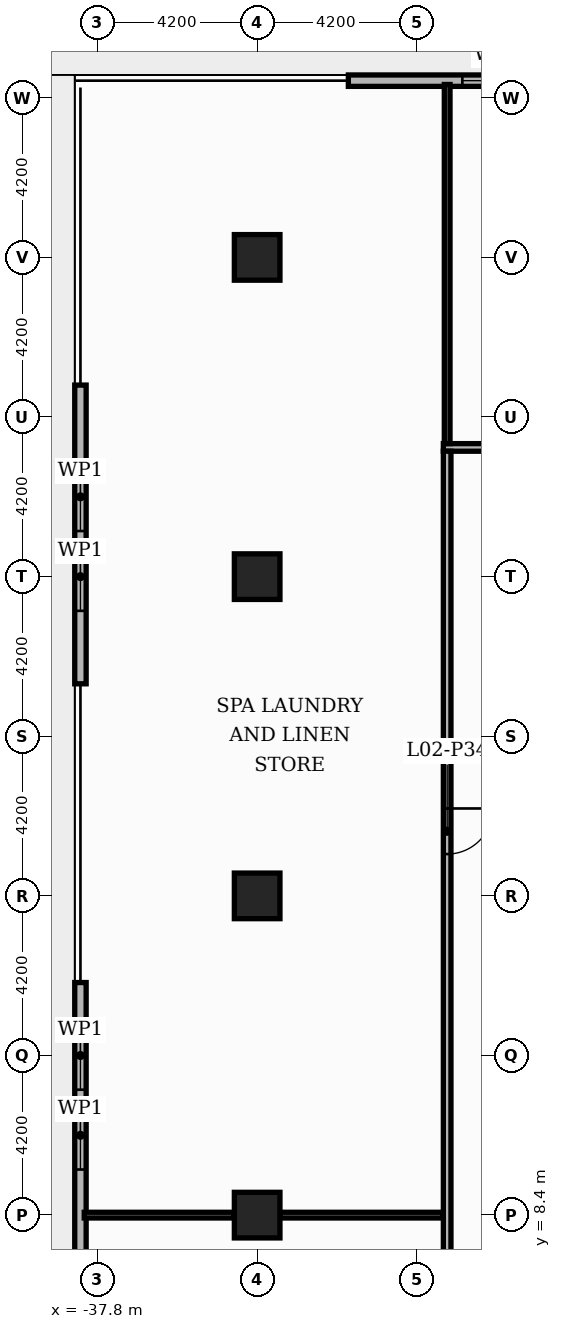
"""IFC4 building model, lengths in metres.
Left out: names, types, materials, properties, quantities, classifications, styles, units other than length and angle.
Written with IfcOpenShell. Run it as: python <this file> out.ifc"""

import sys

from ifc_helpers import new_model, si_unit, direction, frame, frame_2d, origin, origin_2d, place, context, subcontext, project, spatial, rectangle, extrude, element, fill, save


model = new_model("IFC4")
c1 = context("Model", 3, precision=1e-05, world=origin(), true_north=direction((0.0, 1.0)))
c2 = subcontext(c1, "Body", "Model", "MODEL_VIEW")
j1 = project(units=[si_unit("LENGTHUNIT", "METRE"), si_unit("PLANEANGLEUNIT", "RADIAN")], contexts=[c1])
p1 = place(None, origin())
s1 = spatial("IfcSite", under=j1, at=p1, CompositionType="ELEMENT")
p2 = place(p1, origin())
s2 = spatial("IfcBuilding", under=s1, at=p2, CompositionType="ELEMENT")
p3 = place(p2, frame((0.0, 0.0, 12.0)))
s3 = spatial("IfcBuildingStorey", under=s2, at=p3, CompositionType="ELEMENT", Elevation=12.0)
for number, where, z_axis, x_axis in (
    (1, (-33.6, 8.4, 0.0), (0.0, 0.0, 1.0), (1.0, 0.0, 0.0)),
    (2, (-33.6, 16.8, 0.0), (0.0, 0.0, 1.0), (1.0, 0.0, 0.0)),
    (3, (-33.6, 25.2, 0.0), (0.0, 0.0, 1.0), (1.0, 0.0, 0.0)),
    (4, (-33.6, 33.6, 0.0), (0.0, 0.0, 1.0), (1.0, 0.0, 0.0)),
):
    element("IfcColumn", number, at=place(p3, frame(where, z_axis=z_axis, x_axis=x_axis)), inside=s3, PredefinedType="COLUMN", context=c2, shape_type="SweptSolid", body=[
        extrude(rectangle(XDim=1.2, YDim=1.2, at=origin_2d()), origin(), (0.0, 0.0, 1.0), 4.8),
    ])
p4 = place(p3, frame((-24.0, 38.25, 0.0), z_axis=(0.0, 0.0, 1.0), x_axis=(-1.0, 0.0, 0.0)))
e5 = element("IfcWall", 5, at=p4, inside=s3, PredefinedType="STANDARD", context=c2, shape_type="SweptSolid", body=[
    extrude(rectangle(XDim=7.2, YDim=0.3, at=frame_2d((3.6, 0.0))), origin(), (0.0, 0.0, 1.0), 4.38),
])
p5 = place(p4, frame((0.3, 0.0, 0.6)))
e6 = element("IfcOpeningElement", 6, at=p5, cuts=e5, PredefinedType="OPENING", context=c2, shape_type="SweptSolid", body=[
    extrude(rectangle(XDim=1.8, YDim=3.0, at=frame_2d((0.9, 1.5))), frame((0.0, 0.16, 0.0), z_axis=(0.0, -1.0, 0.0), x_axis=(1.0, 0.0, 0.0)), (0.0, 0.0, 1.0), 0.32),
])
p6 = place(p4, frame((2.4, 0.0, 0.6)))
e7 = element("IfcOpeningElement", 7, at=p6, cuts=e5, PredefinedType="OPENING", context=c2, shape_type="SweptSolid", body=[
    extrude(rectangle(XDim=1.8, YDim=3.0, at=frame_2d((0.9, 1.5))), frame((0.0, 0.16, 0.0), z_axis=(0.0, -1.0, 0.0), x_axis=(1.0, 0.0, 0.0)), (0.0, 0.0, 1.0), 0.32),
])
p7 = place(p3, frame((-38.25, 30.24, 0.0), z_axis=(0.0, 0.0, 1.0), x_axis=(0.0, -1.0, 0.0)))
e8 = element("IfcWall", 8, at=p7, inside=s3, PredefinedType="STANDARD", context=c2, shape_type="SweptSolid", body=[
    extrude(rectangle(XDim=7.86, YDim=0.3, at=frame_2d((3.93, 0.0))), origin(), (0.0, 0.0, 1.0), 4.38),
])
p8 = place(p7, frame((2.04, 0.0, 0.6)))
e9 = element("IfcOpeningElement", 9, at=p8, cuts=e8, PredefinedType="OPENING", context=c2, shape_type="SweptSolid", body=[
    extrude(rectangle(XDim=1.8, YDim=3.0, at=frame_2d((0.9, 1.5))), frame((0.0, 0.16, 0.0), z_axis=(0.0, -1.0, 0.0), x_axis=(1.0, 0.0, 0.0)), (0.0, 0.0, 1.0), 0.32),
])
p9 = place(p7, frame((4.14, 0.0, 0.6)))
e10 = element("IfcOpeningElement", 10, at=p9, cuts=e8, PredefinedType="OPENING", context=c2, shape_type="SweptSolid", body=[
    extrude(rectangle(XDim=1.8, YDim=3.0, at=frame_2d((0.9, 1.5))), frame((0.0, 0.16, 0.0), z_axis=(0.0, -1.0, 0.0), x_axis=(1.0, 0.0, 0.0)), (0.0, 0.0, 1.0), 0.32),
])
p10 = place(p3, frame((-38.25, 14.52, 0.0), z_axis=(0.0, 0.0, 1.0), x_axis=(0.0, -1.0, 0.0)))
e11 = element("IfcWall", 11, at=p10, inside=s3, PredefinedType="STANDARD", context=c2, shape_type="SweptSolid", body=[
    extrude(rectangle(XDim=7.86, YDim=0.3, at=frame_2d((3.93, 0.0))), origin(), (0.0, 0.0, 1.0), 4.38),
])
p11 = place(p10, frame((1.02, 0.0, 0.6)))
e12 = element("IfcOpeningElement", 12, at=p11, cuts=e11, PredefinedType="OPENING", context=c2, shape_type="SweptSolid", body=[
    extrude(rectangle(XDim=1.8, YDim=3.0, at=frame_2d((0.9, 1.5))), frame((0.0, 0.16, 0.0), z_axis=(0.0, -1.0, 0.0), x_axis=(1.0, 0.0, 0.0)), (0.0, 0.0, 1.0), 0.32),
])
p12 = place(p10, frame((3.12, 0.0, 0.6)))
e13 = element("IfcOpeningElement", 13, at=p12, cuts=e11, PredefinedType="OPENING", context=c2, shape_type="SweptSolid", body=[
    extrude(rectangle(XDim=1.8, YDim=3.0, at=frame_2d((0.9, 1.5))), frame((0.0, 0.16, 0.0), z_axis=(0.0, -1.0, 0.0), x_axis=(1.0, 0.0, 0.0)), (0.0, 0.0, 1.0), 0.32),
])
p13 = place(p3, frame((-38.15, 8.4, 0.0), z_axis=(0.0, 0.0, 1.0), x_axis=(1.0, 0.0, 0.0)))
e14 = element("IfcWall", 14, at=p13, inside=s3, PredefinedType="PARTITIONING", context=c2, shape_type="SweptSolid", body=[
    extrude(rectangle(XDim=3.95, YDim=0.15, at=frame_2d((1.975, 0.0))), origin(), (0.0, 0.0, 1.0), 4.18),
])
p14 = place(p3, frame((-33.0, 8.4, 0.0), z_axis=(0.0, 0.0, 1.0), x_axis=(1.0, 0.0, 0.0)))
e15 = element("IfcWall", 15, at=p14, inside=s3, PredefinedType="PARTITIONING", context=c2, shape_type="SweptSolid", body=[
    extrude(rectangle(XDim=4.3, YDim=0.15, at=frame_2d((2.15, 0.0))), origin(), (0.0, 0.0, 1.0), 4.18),
])
p15 = place(p3, frame((-28.7, 28.6, 0.0), z_axis=(0.0, 0.0, 1.0), x_axis=(1.0, 0.0, 0.0)))
e16 = element("IfcWall", 16, at=p15, inside=s3, PredefinedType="PARTITIONING", context=c2, shape_type="SweptSolid", body=[
    extrude(rectangle(XDim=57.4, YDim=0.2, at=frame_2d((28.7, 0.0))), origin(), (0.0, 0.0, 1.0), 4.08),
])
p16 = place(p15, frame((7.5, 0.0, 0.0)))
e17 = element("IfcOpeningElement", 17, at=p16, cuts=e16, PredefinedType="OPENING", context=c2, shape_type="SweptSolid", body=[
    extrude(rectangle(XDim=1.2, YDim=2.2, at=frame_2d((0.6, 1.1))), frame((0.0, 0.11, 0.0), z_axis=(0.0, -1.0, 0.0), x_axis=(1.0, 0.0, 0.0)), (0.0, 0.0, 1.0), 0.22),
])
p17 = place(p15, frame((23.9, 0.0, 0.0)))
e18 = element("IfcOpeningElement", 18, at=p17, cuts=e16, PredefinedType="OPENING", context=c2, shape_type="SweptSolid", body=[
    extrude(rectangle(XDim=1.2, YDim=2.2, at=frame_2d((0.6, 1.1))), frame((0.0, 0.11, 0.0), z_axis=(0.0, -1.0, 0.0), x_axis=(1.0, 0.0, 0.0)), (0.0, 0.0, 1.0), 0.22),
])
p18 = place(p15, frame((44.5, 0.0, 0.0)))
e19 = element("IfcOpeningElement", 19, at=p18, cuts=e16, PredefinedType="OPENING", context=c2, shape_type="SweptSolid", body=[
    extrude(rectangle(XDim=1.2, YDim=2.2, at=frame_2d((0.6, 1.1))), frame((0.0, 0.11, 0.0), z_axis=(0.0, -1.0, 0.0), x_axis=(1.0, 0.0, 0.0)), (0.0, 0.0, 1.0), 0.22),
])
p19 = place(p3, frame((-28.6, -28.5, 0.0), z_axis=(0.0, 0.0, 1.0), x_axis=(0.0, 1.0, 0.0)))
e20 = element("IfcWall", 20, at=p19, inside=s3, PredefinedType="PARTITIONING", context=c2, shape_type="SweptSolid", body=[
    extrude(rectangle(XDim=57.0, YDim=0.2, at=frame_2d((28.5, 0.0))), origin(), (0.0, 0.0, 1.0), 4.18),
])
p20 = place(p19, frame((9.4, 0.0, 0.0)))
e21 = element("IfcOpeningElement", 21, at=p20, cuts=e20, PredefinedType="OPENING", context=c2, shape_type="SweptSolid", body=[
    extrude(rectangle(XDim=1.2, YDim=2.2, at=frame_2d((0.6, 1.1))), frame((0.0, 0.11, 0.0), z_axis=(0.0, -1.0, 0.0), x_axis=(1.0, 0.0, 0.0)), (0.0, 0.0, 1.0), 0.22),
])
p21 = place(p19, frame((27.9, 0.0, 0.0)))
e22 = element("IfcOpeningElement", 22, at=p21, cuts=e20, PredefinedType="OPENING", context=c2, shape_type="SweptSolid", body=[
    extrude(rectangle(XDim=1.2, YDim=2.2, at=frame_2d((0.6, 1.1))), frame((0.0, 0.11, 0.0), z_axis=(0.0, -1.0, 0.0), x_axis=(1.0, 0.0, 0.0)), (0.0, 0.0, 1.0), 0.22),
])
p22 = place(p19, frame((46.4, 0.0, 0.0)))
e23 = element("IfcOpeningElement", 23, at=p22, cuts=e20, PredefinedType="OPENING", context=c2, shape_type="SweptSolid", body=[
    extrude(rectangle(XDim=1.2, YDim=2.2, at=frame_2d((0.6, 1.1))), frame((0.0, 0.11, 0.0), z_axis=(0.0, -1.0, 0.0), x_axis=(1.0, 0.0, 0.0)), (0.0, 0.0, 1.0), 0.22),
])
p23 = place(p3, frame((-28.6, 28.7, 0.0), z_axis=(0.0, 0.0, 1.0), x_axis=(0.0, 1.0, 0.0)))
e24 = element("IfcWall", 24, at=p23, inside=s3, PredefinedType="PARTITIONING", context=c2, shape_type="SweptSolid", body=[
    extrude(rectangle(XDim=9.45, YDim=0.15, at=frame_2d((4.725, 0.0))), origin(), (0.0, 0.0, 1.0), 4.18),
])
p24 = place(p6, origin())
e25 = element("IfcWindow", 25, at=p24, inside=s3, PartitioningType="SINGLE_PANEL", PredefinedType="WINDOW", context=c2, shape_type="SweptSolid", body=[
    extrude(rectangle(XDim=1.8, YDim=3.0, at=frame_2d((0.9, 1.5))), frame((0.0, 0.03, 0.0), z_axis=(0.0, -1.0, 0.0), x_axis=(1.0, 0.0, 0.0)), (0.0, 0.0, 1.0), 0.06),
])
fill(e7, e25)
p25 = place(p8, origin())
e26 = element("IfcWindow", 26, at=p25, inside=s3, PartitioningType="SINGLE_PANEL", PredefinedType="WINDOW", context=c2, shape_type="SweptSolid", body=[
    extrude(rectangle(XDim=1.8, YDim=3.0, at=frame_2d((0.9, 1.5))), frame((0.0, 0.03, 0.0), z_axis=(0.0, -1.0, 0.0), x_axis=(1.0, 0.0, 0.0)), (0.0, 0.0, 1.0), 0.06),
])
fill(e9, e26)
p26 = place(p9, origin())
e27 = element("IfcWindow", 27, at=p26, inside=s3, PartitioningType="SINGLE_PANEL", PredefinedType="WINDOW", context=c2, shape_type="SweptSolid", body=[
    extrude(rectangle(XDim=1.8, YDim=3.0, at=frame_2d((0.9, 1.5))), frame((0.0, 0.03, 0.0), z_axis=(0.0, -1.0, 0.0), x_axis=(1.0, 0.0, 0.0)), (0.0, 0.0, 1.0), 0.06),
])
fill(e10, e27)
p27 = place(p11, origin())
e28 = element("IfcWindow", 28, at=p27, inside=s3, PartitioningType="SINGLE_PANEL", PredefinedType="WINDOW", context=c2, shape_type="SweptSolid", body=[
    extrude(rectangle(XDim=1.8, YDim=3.0, at=frame_2d((0.9, 1.5))), frame((0.0, 0.03, 0.0), z_axis=(0.0, -1.0, 0.0), x_axis=(1.0, 0.0, 0.0)), (0.0, 0.0, 1.0), 0.06),
])
fill(e12, e28)
p28 = place(p12, origin())
e29 = element("IfcWindow", 29, at=p28, inside=s3, PartitioningType="SINGLE_PANEL", PredefinedType="WINDOW", context=c2, shape_type="SweptSolid", body=[
    extrude(rectangle(XDim=1.8, YDim=3.0, at=frame_2d((0.9, 1.5))), frame((0.0, 0.03, 0.0), z_axis=(0.0, -1.0, 0.0), x_axis=(1.0, 0.0, 0.0)), (0.0, 0.0, 1.0), 0.06),
])
fill(e13, e29)
p29 = place(p22, origin())
e30 = element("IfcDoor", 30, at=p29, inside=s3, OperationType="SINGLE_SWING_RIGHT", PredefinedType="DOOR", context=c2, shape_type="SweptSolid", body=[
    extrude(rectangle(XDim=1.2, YDim=2.2, at=frame_2d((0.6, 1.1))), frame((0.0, 0.025, 0.0), z_axis=(0.0, -1.0, 0.0), x_axis=(1.0, 0.0, 0.0)), (0.0, 0.0, 1.0), 0.05),
])
fill(e23, e30)
save(model, sys.argv[1])
